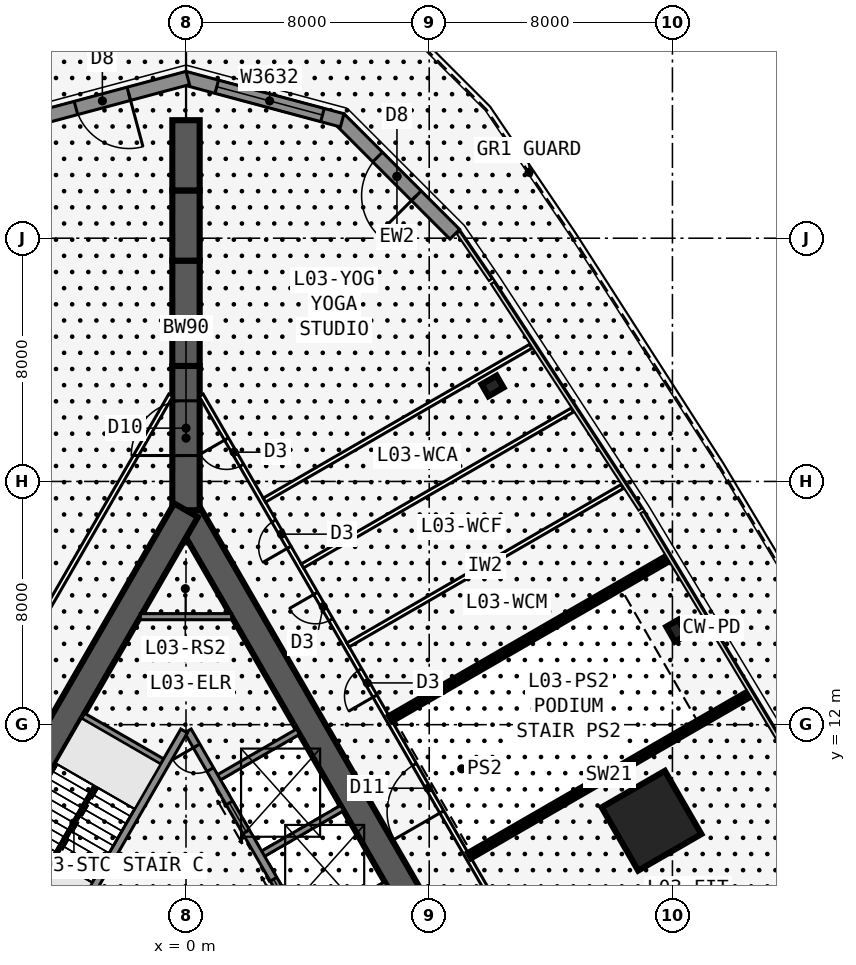
"""IFC4 building model, lengths in metres.
Left out: names, types, materials, properties, quantities, classifications, styles, units other than length and angle.
Written with IfcOpenShell. Run it as: python <this file> out.ifc"""

import sys

from ifc_helpers import new_model, si_unit, direction, frame, frame_2d, origin, origin_2d, place, context, subcontext, project, spatial, rectangle, i_section, extrude, element, fill, save


model = new_model("IFC4")
c1 = context("Model", 3, precision=1e-05, world=origin(), true_north=direction((0.0, 1.0)))
c2 = subcontext(c1, "Body", "Model", "MODEL_VIEW")
j1 = project(units=[si_unit("LENGTHUNIT", "METRE"), si_unit("PLANEANGLEUNIT", "RADIAN")], contexts=[c1])
p1 = place(None, origin())
s1 = spatial("IfcSite", under=j1, at=p1, CompositionType="ELEMENT")
p2 = place(p1, origin())
s2 = spatial("IfcBuilding", under=s1, at=p2, CompositionType="ELEMENT")
p3 = place(p2, frame((0.0, 0.0, 17.5)))
s3 = spatial("IfcBuildingStorey", under=s2, at=p3, CompositionType="ELEMENT", Elevation=17.5)
p4 = place(p3, frame((16.5, -9.526, 0.0), z_axis=(0.0, 0.0, 1.0), x_axis=(-0.499999749417, 0.866025548458, 0.0)))
e1 = element("IfcWall", 1, at=p4, inside=s3, PredefinedType="SHEAR", context=c2, shape_type="SweptSolid", body=[
    extrude(rectangle(XDim=33.0, YDim=0.9, at=frame_2d((16.5, 0.0))), origin(), (0.0, 0.0, 1.0), 5.0),
])
p5 = place(p4, frame((14.15, 0.0, 0.0)))
e2 = element("IfcOpeningElement", 2, at=p5, cuts=e1, PredefinedType="OPENING", context=c2, shape_type="SweptSolid", body=[
    extrude(rectangle(XDim=1.8, YDim=2.13, at=frame_2d((0.9, 1.065))), frame((0.0, 0.46, 0.0), z_axis=(0.0, -1.0, 0.0), x_axis=(1.0, 0.0, 0.0)), (0.0, 0.0, 1.0), 0.92),
])
p6 = place(p4, frame((12.6, 0.0, 0.0)))
e3 = element("IfcOpeningElement", 3, at=p6, cuts=e1, PredefinedType="OPENING", context=c2, shape_type="SweptSolid", body=[
    extrude(rectangle(XDim=1.0, YDim=2.13, at=frame_2d((0.5, 1.065))), frame((0.0, 0.46, 0.0), z_axis=(0.0, -1.0, 0.0), x_axis=(1.0, 0.0, 0.0)), (0.0, 0.0, 1.0), 0.92),
])
p7 = place(p3, frame((5.379, 2.586, 0.0), z_axis=(0.0, 0.0, 1.0), x_axis=(-0.500001375892, 0.866024609411, 0.0)))
e4 = element("IfcWall", 4, at=p7, inside=s3, PredefinedType="SOLIDWALL", context=c2, shape_type="SweptSolid", body=[
    extrude(rectangle(XDim=10.633, YDim=0.25, at=frame_2d((5.316, 0.0))), origin(), (0.0, 0.0, 1.0), 4.75),
])
p8 = place(p7, frame((9.164, 0.0, 0.0)))
e5 = element("IfcOpeningElement", 5, at=p8, cuts=e4, PredefinedType="OPENING", context=c2, shape_type="SweptSolid", body=[
    extrude(rectangle(XDim=0.9, YDim=2.13, at=frame_2d((0.45, 1.065))), frame((0.0, 0.135, 0.0), z_axis=(0.0, -1.0, 0.0), x_axis=(1.0, 0.0, 0.0)), (0.0, 0.0, 1.0), 0.27),
])
p9 = place(p7, frame((1.0, 0.0, 0.0)))
e6 = element("IfcOpeningElement", 6, at=p9, cuts=e4, PredefinedType="OPENING", context=c2, shape_type="SweptSolid", body=[
    extrude(rectangle(XDim=1.1, YDim=2.13, at=frame_2d((0.55, 1.065))), frame((0.0, 0.135, 0.0), z_axis=(0.0, -1.0, 0.0), x_axis=(1.0, 0.0, 0.0)), (0.0, 0.0, 1.0), 0.27),
])
p10 = place(p7, frame((3.9, 0.0, 0.0)))
e7 = element("IfcOpeningElement", 7, at=p10, cuts=e4, PredefinedType="OPENING", context=c2, shape_type="SweptSolid", body=[
    extrude(rectangle(XDim=1.1, YDim=2.13, at=frame_2d((0.55, 1.065))), frame((0.0, 0.135, 0.0), z_axis=(0.0, -1.0, 0.0), x_axis=(1.0, 0.0, 0.0)), (0.0, 0.0, 1.0), 0.27),
])
p11 = place(p7, frame((6.8, 0.0, 0.0)))
e8 = element("IfcOpeningElement", 8, at=p11, cuts=e4, PredefinedType="OPENING", context=c2, shape_type="SweptSolid", body=[
    extrude(rectangle(XDim=1.1, YDim=2.13, at=frame_2d((0.55, 1.065))), frame((0.0, 0.135, 0.0), z_axis=(0.0, -1.0, 0.0), x_axis=(1.0, 0.0, 0.0)), (0.0, 0.0, 1.0), 0.27),
])
for number, where, z_axis, x_axis in (
    (9, (3.879, 5.184, 0.0), (0.0, 0.0, 1.0), (0.866, 0.5, 0.0)),
    (10, (2.429, 7.696, 0.0), (0.0, 0.0, 1.0), (0.866, 0.5, 0.0)),
    (11, (0.979, 10.207, 0.0), (0.0, 0.0, 1.0), (0.866, 0.5, 0.0)),
):
    element("IfcWall", number, at=place(p3, frame(where, z_axis=z_axis, x_axis=x_axis)), inside=s3, PredefinedType="SOLIDWALL", context=c2, shape_type="SweptSolid", body=[
        extrude(rectangle(XDim=3.125, YDim=0.2, at=frame_2d((1.562, 0.0))), origin(), (0.0, 0.0, 1.0), 4.75),
    ])
p12 = place(p3, frame((0.0, 19.052, 0.0), z_axis=(0.0, 0.0, 1.0), x_axis=(-0.499999749417, -0.866025548458, 0.0)))
e12 = element("IfcWall", 12, at=p12, inside=s3, PredefinedType="SHEAR", context=c2, shape_type="SweptSolid", body=[
    extrude(rectangle(XDim=33.0, YDim=0.9, at=frame_2d((16.5, 0.0))), origin(), (0.0, 0.0, 1.0), 5.0),
])
p13 = place(p12, frame((14.15, 0.0, 0.0)))
e13 = element("IfcOpeningElement", 13, at=p13, cuts=e12, PredefinedType="OPENING", context=c2, shape_type="SweptSolid", body=[
    extrude(rectangle(XDim=1.8, YDim=2.13, at=frame_2d((0.9, 1.065))), frame((0.0, 0.46, 0.0), z_axis=(0.0, -1.0, 0.0), x_axis=(1.0, 0.0, 0.0)), (0.0, 0.0, 1.0), 0.92),
])
p14 = place(p12, frame((12.6, 0.0, 0.0)))
e14 = element("IfcOpeningElement", 14, at=p14, cuts=e12, PredefinedType="OPENING", context=c2, shape_type="SweptSolid", body=[
    extrude(rectangle(XDim=1.0, YDim=2.13, at=frame_2d((0.5, 1.065))), frame((0.0, 0.46, 0.0), z_axis=(0.0, -1.0, 0.0), x_axis=(1.0, 0.0, 0.0)), (0.0, 0.0, 1.0), 0.92),
])
p15 = place(p3, frame((-0.062, 11.794, 0.0), z_axis=(0.0, 0.0, 1.0), x_axis=(-0.500006680225, -0.86602154692, 0.0)))
e15 = element("IfcWall", 15, at=p15, inside=s3, PredefinedType="SOLIDWALL", context=c2, shape_type="SweptSolid", body=[
    extrude(rectangle(XDim=7.733, YDim=0.25, at=frame_2d((3.866, 0.0))), origin(), (0.0, 0.0, 1.0), 4.75),
])
for number, where, z_axis, x_axis in (
    (16, (-0.679, 10.727, 0.0), (0.0, 0.0, 1.0), (-0.866, 0.5, 0.0)),
    (17, (-3.879, 5.184, 0.0), (0.0, 0.0, 1.0), (-0.866, 0.5, 0.0)),
):
    element("IfcWall", number, at=place(p3, frame(where, z_axis=z_axis, x_axis=x_axis)), inside=s3, PredefinedType="SOLIDWALL", context=c2, shape_type="SweptSolid", body=[
        extrude(rectangle(XDim=3.125, YDim=0.2, at=frame_2d((1.562, 0.0))), origin(), (0.0, 0.0, 1.0), 4.75),
    ])
p16 = place(p3, frame((0.0, 19.052, 0.0), z_axis=(0.0, 0.0, 1.0), x_axis=(0.0, 1.0, 0.0)))
e18 = element("IfcWall", 18, at=p16, inside=s3, PredefinedType="SHEAR", context=c2, shape_type="SweptSolid", body=[
    extrude(rectangle(XDim=4.746, YDim=0.9, at=frame_2d((2.373, 0.0))), origin(), (0.0, 0.0, 1.0), 5.0),
])
p17 = place(p16, frame((1.8, 0.0, 0.0)))
e19 = element("IfcOpeningElement", 19, at=p17, cuts=e18, PredefinedType="OPENING", context=c2, shape_type="SweptSolid", body=[
    extrude(rectangle(XDim=1.8, YDim=2.13, at=frame_2d((0.9, 1.065))), frame((0.0, 0.46, 0.0), z_axis=(0.0, -1.0, 0.0), x_axis=(1.0, 0.0, 0.0)), (0.0, 0.0, 1.0), 0.92),
])
p18 = place(p3, frame((0.0, 23.799, 0.0), z_axis=(0.0, 0.0, 1.0), x_axis=(0.0, 1.0, 0.0)))
e20 = element("IfcWall", 20, at=p18, inside=s3, PredefinedType="SHEAR", context=c2, shape_type="SweptSolid", body=[
    extrude(rectangle(XDim=1.155, YDim=0.9, at=frame_2d((0.577, 0.0))), origin(), (0.0, 0.0, 1.0), 5.0),
])
p19 = place(p3, frame((0.0, 24.953, 0.0), z_axis=(0.0, 0.0, 1.0), x_axis=(0.0, 1.0, 0.0)))
e21 = element("IfcWall", 21, at=p19, inside=s3, PredefinedType="SHEAR", context=c2, shape_type="SweptSolid", body=[
    extrude(rectangle(XDim=2.309, YDim=0.9, at=frame_2d((1.155, 0.0))), origin(), (0.0, 0.0, 1.0), 5.0),
])
p20 = place(p3, frame((0.0, 27.263, 0.0), z_axis=(0.0, 0.0, 1.0), x_axis=(0.0, 1.0, 0.0)))
e22 = element("IfcWall", 22, at=p20, inside=s3, PredefinedType="SHEAR", context=c2, shape_type="SweptSolid", body=[
    extrude(rectangle(XDim=2.31, YDim=0.9, at=frame_2d((1.155, 0.0))), origin(), (0.0, 0.0, 1.0), 5.0),
])
p21 = place(p3, frame((0.0, 29.572, 0.0), z_axis=(0.0, 0.0, 1.0), x_axis=(0.0, 1.0, 0.0)))
e23 = element("IfcWall", 23, at=p21, inside=s3, PredefinedType="SHEAR", context=c2, shape_type="SweptSolid", body=[
    extrude(rectangle(XDim=2.309, YDim=0.9, at=frame_2d((1.155, 0.0))), origin(), (0.0, 0.0, 1.0), 5.0),
])
for number, where, z_axis, x_axis in (
    (24, (16.137, 15.09, 0.0), (0.0, 0.0, 1.0), (0.866, 0.5, 0.0)),
    (25, (10.083, 23.142, 0.0), (0.0, 0.0, 1.0), (-0.5, 0.866, 0.0)),
):
    element("IfcColumn", number, at=place(p3, frame(where, z_axis=z_axis, x_axis=x_axis)), inside=s3, PredefinedType="COLUMN", context=c2, shape_type="SweptSolid", body=[
        extrude(i_section(OverallWidth=0.455, OverallDepth=0.569, WebThickness=0.078, FlangeThickness=0.125, at=origin_2d()), origin(), (0.0, 0.0, 1.0), 5.0),
    ])
p22 = place(p3, frame((15.312, 8.84, 0.0), z_axis=(0.0, 0.0, 1.0), x_axis=(0.866025403784, 0.5, 0.0)))
e26 = element("IfcColumn", 26, at=p22, inside=s3, PredefinedType="COLUMN", context=c2, shape_type="SweptSolid", body=[
    extrude(rectangle(XDim=2.4, YDim=2.4, at=origin_2d()), origin(), (0.0, 0.0, 1.0), 5.0),
])
p23 = place(p3, frame((8.841, 28.131, 0.0), z_axis=(0.0, 0.0, 1.0), x_axis=(-0.707106781187, 0.707106781187, 0.0)))
e27 = element("IfcWall", 27, at=p23, inside=s3, PredefinedType="SOLIDWALL", context=c2, shape_type="SweptSolid", body=[
    extrude(rectangle(XDim=5.379, YDim=0.45, at=frame_2d((2.689, 0.0))), origin(), (0.0, 0.0, 1.0), 4.75),
])
p24 = place(p23, frame((1.79, 0.0, 0.0)))
e28 = element("IfcOpeningElement", 28, at=p24, cuts=e27, PredefinedType="OPENING", context=c2, shape_type="SweptSolid", body=[
    extrude(rectangle(XDim=1.8, YDim=2.4, at=frame_2d((0.9, 1.2))), frame((0.0, 0.235, 0.0), z_axis=(0.0, -1.0, 0.0), x_axis=(1.0, 0.0, 0.0)), (0.0, 0.0, 1.0), 0.47),
])
p25 = place(p3, frame((5.138, 31.877, 0.0), z_axis=(0.0, 0.0, 1.0), x_axis=(-0.965923133363, 0.258829095032, 0.0)))
e29 = element("IfcWall", 29, at=p25, inside=s3, PredefinedType="SOLIDWALL", context=c2, shape_type="SweptSolid", body=[
    extrude(rectangle(XDim=5.379, YDim=0.45, at=frame_2d((2.69, 0.0))), origin(), (0.0, 0.0, 1.0), 4.75),
])
p26 = place(p25, frame((0.671, 0.0, 0.6)))
e30 = element("IfcOpeningElement", 30, at=p26, cuts=e29, PredefinedType="OPENING", context=c2, shape_type="SweptSolid", body=[
    extrude(rectangle(XDim=3.6, YDim=3.2, at=frame_2d((1.8, 1.6))), frame((0.0, 0.235, 0.0), z_axis=(0.0, -1.0, 0.0), x_axis=(1.0, 0.0, 0.0)), (0.0, 0.0, 1.0), 0.47),
])
p27 = place(p3, frame((0.058, 33.269, 0.0), z_axis=(0.0, 0.0, 1.0), x_axis=(-0.965923133363, -0.258829095032, 0.0)))
e31 = element("IfcWall", 31, at=p27, inside=s3, PredefinedType="SOLIDWALL", context=c2, shape_type="SweptSolid", body=[
    extrude(rectangle(XDim=5.379, YDim=0.45, at=frame_2d((2.69, 0.0))), origin(), (0.0, 0.0, 1.0), 4.75),
])
p28 = place(p27, frame((2.008, 0.0, 0.0)))
e32 = element("IfcOpeningElement", 32, at=p28, cuts=e31, PredefinedType="OPENING", context=c2, shape_type="SweptSolid", body=[
    extrude(rectangle(XDim=1.8, YDim=2.4, at=frame_2d((0.9, 1.2))), frame((0.0, 0.235, 0.0), z_axis=(0.0, -1.0, 0.0), x_axis=(1.0, 0.0, 0.0)), (0.0, 0.0, 1.0), 0.47),
])
p29 = place(p3, frame((20.027, -10.985, 0.0), z_axis=(0.0, 0.0, 1.0), x_axis=(-0.500001677587, 0.866024435227, 0.0)))
e33 = element("IfcWall", 33, at=p29, inside=s3, PredefinedType="PARTITIONING", context=c2, shape_type="SweptSolid", body=[
    extrude(rectangle(XDim=39.054, YDim=0.15, at=frame_2d((19.527, 0.0))), origin(), (0.0, 0.0, 1.0), 4.75),
])
p30 = place(p29, frame((10.013, 0.0, 0.0)))
e34 = element("IfcOpeningElement", 34, at=p30, cuts=e33, PredefinedType="OPENING", context=c2, shape_type="SweptSolid", body=[
    extrude(rectangle(XDim=1.8, YDim=2.13, at=frame_2d((0.9, 1.065))), frame((0.0, 0.085, 0.0), z_axis=(0.0, -1.0, 0.0), x_axis=(1.0, 0.0, 0.0)), (0.0, 0.0, 1.0), 0.17),
])
p31 = place(p29, frame((23.227, 0.0, 0.0)))
e35 = element("IfcOpeningElement", 35, at=p31, cuts=e33, PredefinedType="OPENING", context=c2, shape_type="SweptSolid", body=[
    extrude(rectangle(XDim=1.8, YDim=2.13, at=frame_2d((0.9, 1.065))), frame((0.0, 0.085, 0.0), z_axis=(0.0, -1.0, 0.0), x_axis=(1.0, 0.0, 0.0)), (0.0, 0.0, 1.0), 0.17),
])
p32 = place(p29, frame((27.627, 0.0, 0.0)))
e36 = element("IfcOpeningElement", 36, at=p32, cuts=e33, PredefinedType="OPENING", context=c2, shape_type="SweptSolid", body=[
    extrude(rectangle(XDim=1.0, YDim=2.13, at=frame_2d((0.5, 1.065))), frame((0.0, 0.085, 0.0), z_axis=(0.0, -1.0, 0.0), x_axis=(1.0, 0.0, 0.0)), (0.0, 0.0, 1.0), 0.17),
])
p33 = place(p29, frame((30.527, 0.0, 0.0)))
e37 = element("IfcOpeningElement", 37, at=p33, cuts=e33, PredefinedType="OPENING", context=c2, shape_type="SweptSolid", body=[
    extrude(rectangle(XDim=1.0, YDim=2.13, at=frame_2d((0.5, 1.065))), frame((0.0, 0.085, 0.0), z_axis=(0.0, -1.0, 0.0), x_axis=(1.0, 0.0, 0.0)), (0.0, 0.0, 1.0), 0.17),
])
p34 = place(p29, frame((33.277, 0.0, 0.0)))
e38 = element("IfcOpeningElement", 38, at=p34, cuts=e33, PredefinedType="OPENING", context=c2, shape_type="SweptSolid", body=[
    extrude(rectangle(XDim=1.0, YDim=2.13, at=frame_2d((0.5, 1.065))), frame((0.0, 0.085, 0.0), z_axis=(0.0, -1.0, 0.0), x_axis=(1.0, 0.0, 0.0)), (0.0, 0.0, 1.0), 0.17),
])
p35 = place(p29, frame((36.39, 0.0, 0.0)))
e39 = element("IfcOpeningElement", 39, at=p35, cuts=e33, PredefinedType="OPENING", context=c2, shape_type="SweptSolid", body=[
    extrude(rectangle(XDim=1.0, YDim=2.13, at=frame_2d((0.5, 1.065))), frame((0.0, 0.085, 0.0), z_axis=(0.0, -1.0, 0.0), x_axis=(1.0, 0.0, 0.0)), (0.0, 0.0, 1.0), 0.17),
])
p36 = place(p3, frame((9.329, 7.695, 0.0), z_axis=(0.0, 0.0, 1.0), x_axis=(0.866032486376, 0.49998773239, 0.0)))
e40 = element("IfcWall", 40, at=p36, inside=s3, PredefinedType="SHEAR", context=c2, shape_type="SweptSolid", body=[
    extrude(rectangle(XDim=10.595, YDim=0.2, at=frame_2d((5.298, 0.0))), origin(), (0.0, 0.0, 1.0), 5.0),
])
p37 = place(p3, frame((6.729, 12.198, 0.0), z_axis=(0.0, 0.0, 1.0), x_axis=(0.866025701527, 0.499999484295, 0.0)))
e41 = element("IfcWall", 41, at=p37, inside=s3, PredefinedType="SHEAR", context=c2, shape_type="SweptSolid", body=[
    extrude(rectangle(XDim=10.502, YDim=0.2, at=frame_2d((5.251, 0.0))), origin(), (0.0, 0.0, 1.0), 5.0),
])
p38 = place(p3, frame((5.329, 14.623, 0.0), z_axis=(0.0, 0.0, 1.0), x_axis=(0.866015347915, 0.500017416873, 0.0)))
e42 = element("IfcWall", 42, at=p38, inside=s3, PredefinedType="PARTITIONING", context=c2, shape_type="SweptSolid", body=[
    extrude(rectangle(XDim=10.413, YDim=0.15, at=frame_2d((5.207, 0.0))), origin(), (0.0, 0.0, 1.0), 3.808),
])
p39 = place(p3, frame((3.829, 17.221, 0.0), z_axis=(0.0, 0.0, 1.0), x_axis=(0.86601543224, 0.500017270824, 0.0)))
e43 = element("IfcWall", 43, at=p39, inside=s3, PredefinedType="PARTITIONING", context=c2, shape_type="SweptSolid", body=[
    extrude(rectangle(XDim=10.251, YDim=0.15, at=frame_2d((5.125, 0.0))), origin(), (0.0, 0.0, 1.0), 4.75),
])
p40 = place(p3, frame((2.579, 19.386, 0.0), z_axis=(0.0, 0.0, 1.0), x_axis=(0.866026027784, 0.499998919199, 0.0)))
e44 = element("IfcWall", 44, at=p40, inside=s3, PredefinedType="PARTITIONING", context=c2, shape_type="SweptSolid", body=[
    extrude(rectangle(XDim=10.116, YDim=0.15, at=frame_2d((5.058, 0.0))), origin(), (0.0, 0.0, 1.0), 4.75),
])
p41 = place(p3, frame((-0.5, 22.836, 0.0), z_axis=(0.0, 0.0, 1.0), x_axis=(-0.500001677587, -0.866024435227, 0.0)))
e45 = element("IfcWall", 45, at=p41, inside=s3, PredefinedType="PARTITIONING", context=c2, shape_type="SweptSolid", body=[
    extrude(rectangle(XDim=39.054, YDim=0.15, at=frame_2d((19.527, 0.0))), origin(), (0.0, 0.0, 1.0), 4.75),
])
p42 = place(p41, frame((10.414, 0.0, 0.0)))
e46 = element("IfcOpeningElement", 46, at=p42, cuts=e45, PredefinedType="OPENING", context=c2, shape_type="SweptSolid", body=[
    extrude(rectangle(XDim=1.0, YDim=2.13, at=frame_2d((0.5, 1.065))), frame((0.0, 0.085, 0.0), z_axis=(0.0, -1.0, 0.0), x_axis=(1.0, 0.0, 0.0)), (0.0, 0.0, 1.0), 0.17),
])
p43 = place(p41, frame((23.227, 0.0, 0.0)))
e47 = element("IfcOpeningElement", 47, at=p43, cuts=e45, PredefinedType="OPENING", context=c2, shape_type="SweptSolid", body=[
    extrude(rectangle(XDim=1.8, YDim=2.13, at=frame_2d((0.9, 1.065))), frame((0.0, 0.085, 0.0), z_axis=(0.0, -1.0, 0.0), x_axis=(1.0, 0.0, 0.0)), (0.0, 0.0, 1.0), 0.17),
])
p44 = place(p41, frame((27.627, 0.0, 0.0)))
e48 = element("IfcOpeningElement", 48, at=p44, cuts=e45, PredefinedType="OPENING", context=c2, shape_type="SweptSolid", body=[
    extrude(rectangle(XDim=1.0, YDim=2.13, at=frame_2d((0.5, 1.065))), frame((0.0, 0.085, 0.0), z_axis=(0.0, -1.0, 0.0), x_axis=(1.0, 0.0, 0.0)), (0.0, 0.0, 1.0), 0.17),
])
p45 = place(p41, frame((30.277, 0.0, 0.0)))
e49 = element("IfcOpeningElement", 49, at=p45, cuts=e45, PredefinedType="OPENING", context=c2, shape_type="SweptSolid", body=[
    extrude(rectangle(XDim=1.0, YDim=2.13, at=frame_2d((0.5, 1.065))), frame((0.0, 0.085, 0.0), z_axis=(0.0, -1.0, 0.0), x_axis=(1.0, 0.0, 0.0)), (0.0, 0.0, 1.0), 0.17),
])
p46 = place(p41, frame((34.89, 0.0, 0.0)))
e50 = element("IfcOpeningElement", 50, at=p46, cuts=e45, PredefinedType="OPENING", context=c2, shape_type="SweptSolid", body=[
    extrude(rectangle(XDim=1.0, YDim=2.13, at=frame_2d((0.5, 1.065))), frame((0.0, 0.085, 0.0), z_axis=(0.0, -1.0, 0.0), x_axis=(1.0, 0.0, 0.0)), (0.0, 0.0, 1.0), 0.17),
])
p47 = place(p3, frame((-1.501, 15.552, 0.0), z_axis=(0.0, 0.0, 1.0), x_axis=(1.0, 0.0, 0.0)))
e51 = element("IfcWall", 51, at=p47, inside=s3, PredefinedType="SOLIDWALL", context=c2, shape_type="SweptSolid", body=[
    extrude(rectangle(XDim=3.002, YDim=0.2, at=frame_2d((1.501, 0.0))), origin(), (0.0, 0.0, 1.0), 4.75),
])
p48 = place(p3, frame((-2.988, 9.978, 0.0), z_axis=(0.0, 0.0, 1.0), x_axis=(-0.499992232847, -0.866029888106, 0.0)))
e52 = element("IfcWall", 52, at=p48, inside=s3, PredefinedType="SOLIDWALL", context=c2, shape_type="SweptSolid", body=[
    extrude(rectangle(XDim=2.794, YDim=0.1, at=frame_2d((1.397, 0.0))), origin(), (0.0, 0.0, 1.0), 5.0),
])
p49 = place(p24, origin())
e53 = element("IfcDoor", 53, at=p49, inside=s3, OperationType="DOUBLE_DOOR_SINGLE_SWING", PredefinedType="DOOR", context=c2, shape_type="SweptSolid", body=[
    extrude(rectangle(XDim=1.8, YDim=2.4, at=frame_2d((0.9, 1.2))), frame((0.0, 0.025, 0.0), z_axis=(0.0, -1.0, 0.0), x_axis=(1.0, 0.0, 0.0)), (0.0, 0.0, 1.0), 0.05),
])
fill(e28, e53)
p50 = place(p26, origin())
e54 = element("IfcWindow", 54, at=p50, inside=s3, PartitioningType="SINGLE_PANEL", PredefinedType="WINDOW", context=c2, shape_type="SweptSolid", body=[
    extrude(rectangle(XDim=3.6, YDim=3.2, at=frame_2d((1.8, 1.6))), frame((0.0, 0.03, 0.0), z_axis=(0.0, -1.0, 0.0), x_axis=(1.0, 0.0, 0.0)), (0.0, 0.0, 1.0), 0.06),
])
fill(e30, e54)
p51 = place(p28, origin())
e55 = element("IfcDoor", 55, at=p51, inside=s3, OperationType="DOUBLE_DOOR_SINGLE_SWING", PredefinedType="DOOR", context=c2, shape_type="SweptSolid", body=[
    extrude(rectangle(XDim=1.8, YDim=2.4, at=frame_2d((0.9, 1.2))), frame((0.0, 0.025, 0.0), z_axis=(0.0, -1.0, 0.0), x_axis=(1.0, 0.0, 0.0)), (0.0, 0.0, 1.0), 0.05),
])
fill(e32, e55)
p52 = place(p31, origin())
e56 = element("IfcDoor", 56, at=p52, inside=s3, OperationType="DOUBLE_DOOR_SINGLE_SWING", PredefinedType="DOOR", context=c2, shape_type="SweptSolid", body=[
    extrude(rectangle(XDim=1.8, YDim=2.13, at=frame_2d((0.9, 1.065))), frame((0.0, 0.025, 0.0), z_axis=(0.0, -1.0, 0.0), x_axis=(1.0, 0.0, 0.0)), (0.0, 0.0, 1.0), 0.05),
])
fill(e35, e56)
p53 = place(p32, origin())
e57 = element("IfcDoor", 57, at=p53, inside=s3, OperationType="SINGLE_SWING_LEFT", PredefinedType="DOOR", context=c2, shape_type="SweptSolid", body=[
    extrude(rectangle(XDim=1.0, YDim=2.13, at=frame_2d((0.5, 1.065))), frame((0.0, 0.025, 0.0), z_axis=(0.0, -1.0, 0.0), x_axis=(1.0, 0.0, 0.0)), (0.0, 0.0, 1.0), 0.05),
])
fill(e36, e57)
p54 = place(p33, origin())
e58 = element("IfcDoor", 58, at=p54, inside=s3, OperationType="SINGLE_SWING_RIGHT", PredefinedType="DOOR", context=c2, shape_type="SweptSolid", body=[
    extrude(rectangle(XDim=1.0, YDim=2.13, at=frame_2d((0.5, 1.065))), frame((0.0, 0.025, 0.0), z_axis=(0.0, -1.0, 0.0), x_axis=(1.0, 0.0, 0.0)), (0.0, 0.0, 1.0), 0.05),
])
fill(e37, e58)
p55 = place(p34, origin())
e59 = element("IfcDoor", 59, at=p55, inside=s3, OperationType="SINGLE_SWING_LEFT", PredefinedType="DOOR", context=c2, shape_type="SweptSolid", body=[
    extrude(rectangle(XDim=1.0, YDim=2.13, at=frame_2d((0.5, 1.065))), frame((0.0, 0.025, 0.0), z_axis=(0.0, -1.0, 0.0), x_axis=(1.0, 0.0, 0.0)), (0.0, 0.0, 1.0), 0.05),
])
fill(e38, e59)
p56 = place(p35, origin())
e60 = element("IfcDoor", 60, at=p56, inside=s3, OperationType="SINGLE_SWING_RIGHT", PredefinedType="DOOR", context=c2, shape_type="SweptSolid", body=[
    extrude(rectangle(XDim=1.0, YDim=2.13, at=frame_2d((0.5, 1.065))), frame((0.0, 0.025, 0.0), z_axis=(0.0, -1.0, 0.0), x_axis=(1.0, 0.0, 0.0)), (0.0, 0.0, 1.0), 0.05),
])
fill(e39, e60)
p57 = place(p17, origin())
e61 = element("IfcDoor", 61, at=p57, inside=s3, OperationType="DOUBLE_DOOR_DOUBLE_SWING", PredefinedType="DOOR", context=c2, shape_type="SweptSolid", body=[
    extrude(rectangle(XDim=1.8, YDim=2.13, at=frame_2d((0.9, 1.065))), frame((0.0, 0.025, 0.0), z_axis=(0.0, -1.0, 0.0), x_axis=(1.0, 0.0, 0.0)), (0.0, 0.0, 1.0), 0.05),
])
fill(e19, e61)
p58 = place(p8, origin())
e62 = element("IfcDoor", 62, at=p58, inside=s3, OperationType="SINGLE_SWING_RIGHT", PredefinedType="DOOR", context=c2, shape_type="SweptSolid", body=[
    extrude(rectangle(XDim=0.9, YDim=2.13, at=frame_2d((0.45, 1.065))), frame((0.0, 0.025, 0.0), z_axis=(0.0, -1.0, 0.0), x_axis=(1.0, 0.0, 0.0)), (0.0, 0.0, 1.0), 0.05),
])
fill(e5, e62)
p59 = place(p10, origin())
e63 = element("IfcDoor", 63, at=p59, inside=s3, OperationType="DOUBLE_DOOR_SLIDING", PredefinedType="USERDEFINED", context=c2, shape_type="SweptSolid", body=[
    extrude(rectangle(XDim=1.1, YDim=2.13, at=frame_2d((0.55, 1.065))), frame((0.0, 0.025, 0.0), z_axis=(0.0, -1.0, 0.0), x_axis=(1.0, 0.0, 0.0)), (0.0, 0.0, 1.0), 0.05),
])
fill(e7, e63)
p60 = place(p11, origin())
e64 = element("IfcDoor", 64, at=p60, inside=s3, OperationType="DOUBLE_DOOR_SLIDING", PredefinedType="USERDEFINED", context=c2, shape_type="SweptSolid", body=[
    extrude(rectangle(XDim=1.1, YDim=2.13, at=frame_2d((0.55, 1.065))), frame((0.0, 0.025, 0.0), z_axis=(0.0, -1.0, 0.0), x_axis=(1.0, 0.0, 0.0)), (0.0, 0.0, 1.0), 0.05),
])
fill(e8, e64)
save(model, sys.argv[1])
